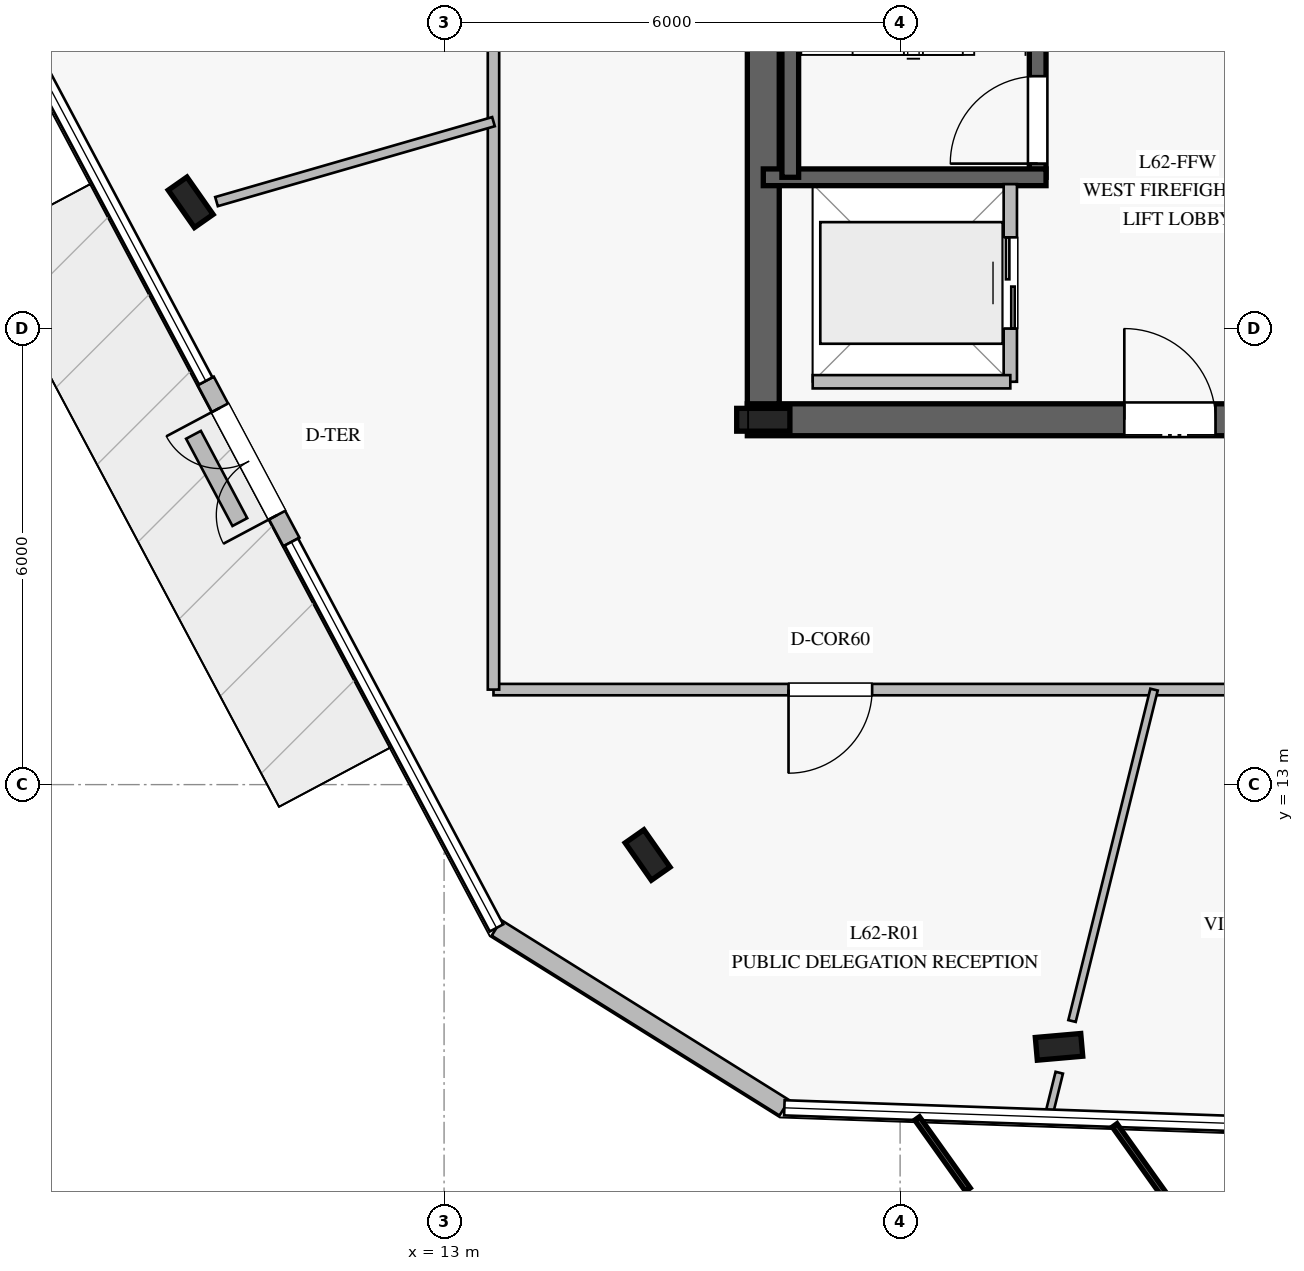
"""IFC4 building model, lengths in metres.
Left out: names, types, materials, properties, quantities, classifications, styles, units other than length and angle.
Written with IfcOpenShell. Run it as: python <this file> out.ifc"""

import sys

from ifc_helpers import new_model, si_unit, direction, frame, frame_2d, origin, origin_2d, place, context, subcontext, project, spatial, rectangle, i_section, extrude, element, fill, save


model = new_model("IFC4")
c1 = context("Model", 3, precision=1e-05, world=origin(), true_north=direction((0.0, 1.0)))
c2 = subcontext(c1, "Body", "Model", "MODEL_VIEW")
j1 = project(units=[si_unit("LENGTHUNIT", "METRE"), si_unit("PLANEANGLEUNIT", "RADIAN")], contexts=[c1])
p1 = place(None, origin())
s1 = spatial("IfcSite", under=j1, at=p1, CompositionType="ELEMENT")
p2 = place(p1, origin())
s2 = spatial("IfcBuilding", under=s1, at=p2, CompositionType="ELEMENT")
p3 = place(p2, frame((0.0, 0.0, 258.2)))
s3 = spatial("IfcBuildingStorey", under=s2, at=p3, CompositionType="ELEMENT", Elevation=258.2)
p4 = place(p3, frame((16.99, 17.8, 0.0), z_axis=(0.0, 0.0, 1.0), x_axis=(1.0, 0.0, 0.0)))
e1 = element("IfcWall", 1, at=p4, inside=s3, PredefinedType="SHEAR", context=c2, shape_type="SweptSolid", body=[
    extrude(rectangle(XDim=16.02, YDim=0.42, at=frame_2d((8.01, 0.0))), origin(), (0.0, 0.0, 1.0), 3.78),
])
p5 = place(p4, frame((4.96, 0.0, 0.0)))
e2 = element("IfcOpeningElement", 2, at=p5, cuts=e1, PredefinedType="OPENING", context=c2, shape_type="SweptSolid", body=[
    extrude(rectangle(XDim=1.2, YDim=2.25, at=frame_2d((0.6, 1.125))), frame((0.0, 0.22, 0.0), z_axis=(0.0, -1.0, 0.0), x_axis=(1.0, 0.0, 0.0)), (0.0, 0.0, 1.0), 0.44),
])
p6 = place(p4, frame((13.91, 0.0, 0.0)))
e3 = element("IfcOpeningElement", 3, at=p6, cuts=e1, PredefinedType="OPENING", context=c2, shape_type="SweptSolid", body=[
    extrude(rectangle(XDim=0.9, YDim=2.1, at=frame_2d((0.45, 1.05))), frame((0.0, 0.22, 0.0), z_axis=(0.0, -1.0, 0.0), x_axis=(1.0, 0.0, 0.0)), (0.0, 0.0, 1.0), 0.44),
])
p7 = place(p4, frame((9.16, 0.0, 0.0)))
e4 = element("IfcOpeningElement", 4, at=p7, cuts=e1, PredefinedType="OPENING", context=c2, shape_type="SweptSolid", body=[
    extrude(rectangle(XDim=1.1, YDim=2.2, at=frame_2d((0.55, 1.1))), frame((0.0, 0.22, 0.0), z_axis=(0.0, -1.0, 0.0), x_axis=(1.0, 0.0, 0.0)), (0.0, 0.0, 1.0), 0.44),
])
p8 = place(p3, frame((17.2, 31.99, 0.0), z_axis=(0.0, 0.0, 1.0), x_axis=(0.0, -1.0, 0.0)))
e5 = element("IfcWall", 5, at=p8, inside=s3, PredefinedType="SHEAR", context=c2, shape_type="SweptSolid", body=[
    extrude(rectangle(XDim=13.98, YDim=0.42, at=frame_2d((6.99, 0.0))), origin(), (0.0, 0.0, 1.0), 3.78),
])
p9 = place(p8, frame((2.14, 0.0, 0.0)))
e6 = element("IfcOpeningElement", 6, at=p9, cuts=e5, PredefinedType="OPENING", context=c2, shape_type="SweptSolid", body=[
    extrude(rectangle(XDim=1.5, YDim=2.2, at=frame_2d((0.75, 1.1))), frame((0.0, 0.22, 0.0), z_axis=(0.0, -1.0, 0.0), x_axis=(1.0, 0.0, 0.0)), (0.0, 0.0, 1.0), 0.44),
])
p10 = place(p3, frame((17.2, 17.8, 0.0), z_axis=(0.0, 0.0, 1.0), x_axis=(1.0, 0.0, 0.0)))
e7 = element("IfcColumn", 7, at=p10, inside=s3, PredefinedType="COLUMN", context=c2, shape_type="SweptSolid", body=[
    extrude(i_section(OverallWidth=0.3, OverallDepth=0.7, WebThickness=0.017, FlangeThickness=0.032, at=origin_2d()), origin(), (0.0, 0.0, 1.0), 4.0),
])
p11 = place(p3, frame((20.81, 20.99, 0.0), z_axis=(0.0, 0.0, 1.0), x_axis=(0.0, 1.0, 0.0)))
e8 = element("IfcWall", 8, at=p11, inside=s3, PredefinedType="SOLIDWALL", context=c2, shape_type="SweptSolid", body=[
    extrude(rectangle(XDim=7.22, YDim=0.22, at=frame_2d((3.61, 0.0))), origin(), (0.0, 0.0, 1.0), 3.78),
])
p12 = place(p11, frame((0.18, 0.0, 0.0)))
e9 = element("IfcOpeningElement", 9, at=p12, cuts=e8, PredefinedType="OPENING", context=c2, shape_type="SweptSolid", body=[
    extrude(rectangle(XDim=1.15, YDim=2.2, at=frame_2d((0.575, 1.1))), frame((0.0, 0.12, 0.0), z_axis=(0.0, -1.0, 0.0), x_axis=(1.0, 0.0, 0.0)), (0.0, 0.0, 1.0), 0.24),
])
p13 = place(p3, frame((17.2, 20.99, 0.0), z_axis=(0.0, 0.0, 1.0), x_axis=(1.0, 0.0, 0.0)))
e10 = element("IfcWall", 10, at=p13, inside=s3, PredefinedType="SOLIDWALL", context=c2, shape_type="SweptSolid", body=[
    extrude(rectangle(XDim=3.72, YDim=0.22, at=frame_2d((1.86, 0.0))), origin(), (0.0, 0.0, 1.0), 3.78),
])
p14 = place(p3, frame((17.555, 28.21, 0.0), z_axis=(0.0, 0.0, 1.0), x_axis=(0.0, -1.0, 0.0)))
e11 = element("IfcWall", 11, at=p14, inside=s3, PredefinedType="SOLIDWALL", context=c2, shape_type="SweptSolid", body=[
    extrude(rectangle(XDim=7.22, YDim=0.22, at=frame_2d((3.61, 0.0))), origin(), (0.0, 0.0, 1.0), 3.78),
])
for number, where, z_axis, x_axis in (
    (12, (9.666, 20.661, 0.0), (0.0, 0.0, 1.0), (-0.574, 0.819, 0.0)),
    (13, (15.678, 12.074, 0.0), (0.0, 0.0, 1.0), (-0.574, 0.819, 0.0)),
    (14, (21.091, 9.55, 0.0), (0.0, 0.0, 1.0), (0.996, 0.087, 0.0)),
):
    element("IfcColumn", number, at=place(p3, frame(where, z_axis=z_axis, x_axis=x_axis)), inside=s3, PredefinedType="COLUMN", context=c2, shape_type="SweptSolid", body=[
        extrude(i_section(OverallWidth=0.3, OverallDepth=0.6, WebThickness=0.015, FlangeThickness=0.03, at=origin_2d()), origin(), (0.0, 0.0, 1.0), 4.0),
    ])
p15 = place(p3, frame((9.864, 18.311, 0.0), z_axis=(0.0, 0.0, 1.0), x_axis=(0.469531998299, -0.882915456073, 0.0)))
e15 = element("IfcWall", 15, at=p15, inside=s3, PredefinedType="STANDARD", context=c2, shape_type="SweptSolid", body=[
    extrude(rectangle(XDim=2.4, YDim=0.24, at=frame_2d((1.2, 0.0))), origin(), (0.0, 0.0, 1.0), 3.78),
])
p16 = place(p15, frame((0.4, 0.0, 0.0)))
e16 = element("IfcOpeningElement", 16, at=p16, cuts=e15, PredefinedType="OPENING", context=c2, shape_type="SweptSolid", body=[
    extrude(rectangle(XDim=1.6, YDim=2.25, at=frame_2d((0.8, 1.125))), frame((0.0, 0.13, 0.0), z_axis=(0.0, -1.0, 0.0), x_axis=(1.0, 0.0, 0.0)), (0.0, 0.0, 1.0), 0.26),
])
p17 = place(p3, frame((13.69, 11.115, 0.0), z_axis=(0.0, 0.0, 1.0), x_axis=(0.847998304005, -0.529998940003, 0.0)))
e17 = element("IfcWall", 17, at=p17, inside=s3, PredefinedType="STANDARD", context=c2, shape_type="SweptSolid", body=[
    extrude(rectangle(XDim=4.466, YDim=0.24, at=frame_2d((2.233, 0.0))), origin(), (0.0, 0.0, 1.0), 3.78),
])
p18 = place(p3, frame((9.703, 17.602, 0.0), z_axis=(0.0, 0.0, 1.0), x_axis=(0.4693108362, -0.883033033938, 0.0)))
e18 = element("IfcWall", 18, at=p18, inside=s3, PredefinedType="USERDEFINED", context=c2, shape_type="SweptSolid", body=[
    extrude(rectangle(XDim=1.3, YDim=0.22, at=frame_2d((0.65, 0.0))), origin(), (0.0, 0.0, 1.0), 0.4),
])
p19 = place(p3, frame((20.45, 18.3, 0.0), z_axis=(0.0, 0.0, 1.0), x_axis=(0.0, 1.0, 0.0)))
e19 = element("IfcWall", 19, at=p19, inside=s3, PredefinedType="PARTITIONING", context=c2, shape_type="SweptSolid", body=[
    extrude(rectangle(XDim=2.6, YDim=0.175, at=frame_2d((1.3, 0.0))), origin(), (0.0, 0.0, 1.0), 3.78),
])
p20 = place(p19, frame((0.7, 0.0, 0.0)))
e20 = element("IfcOpeningElement", 20, at=p20, cuts=e19, PredefinedType="OPENING", context=c2, shape_type="SweptSolid", body=[
    extrude(rectangle(XDim=1.2, YDim=2.2, at=frame_2d((0.6, 1.1))), frame((0.0, 0.098, 0.0), z_axis=(0.0, -1.0, 0.0), x_axis=(1.0, 0.0, 0.0)), (0.0, 0.0, 1.0), 0.195),
])
p21 = place(p3, frame((17.85, 18.3, 0.0), z_axis=(0.0, 0.0, 1.0), x_axis=(1.0, 0.0, 0.0)))
e21 = element("IfcWall", 21, at=p21, inside=s3, PredefinedType="PARTITIONING", context=c2, shape_type="SweptSolid", body=[
    extrude(rectangle(XDim=2.6, YDim=0.175, at=frame_2d((1.3, 0.0))), origin(), (0.0, 0.0, 1.0), 3.78),
])
p22 = place(p3, frame((36.35, 14.25, 0.0), z_axis=(0.0, 0.0, 1.0), x_axis=(-1.0, 0.0, 0.0)))
e22 = element("IfcWall", 22, at=p22, inside=s3, PredefinedType="PARTITIONING", context=c2, shape_type="SweptSolid", body=[
    extrude(rectangle(XDim=22.7, YDim=0.15, at=frame_2d((11.35, 0.0))), origin(), (0.0, 0.0, 1.0), 3.28),
])
p23 = place(p22, frame((17.718, 0.0, 0.0)))
e23 = element("IfcOpeningElement", 23, at=p23, cuts=e22, PredefinedType="OPENING", context=c2, shape_type="SweptSolid", body=[
    extrude(rectangle(XDim=1.1, YDim=2.2, at=frame_2d((0.55, 1.1))), frame((0.0, 0.085, 0.0), z_axis=(0.0, -1.0, 0.0), x_axis=(1.0, 0.0, 0.0)), (0.0, 0.0, 1.0), 0.17),
])
p24 = place(p22, frame((8.322, 0.0, 0.0)))
e24 = element("IfcOpeningElement", 24, at=p24, cuts=e22, PredefinedType="OPENING", context=c2, shape_type="SweptSolid", body=[
    extrude(rectangle(XDim=1.1, YDim=2.2, at=frame_2d((0.55, 1.1))), frame((0.0, 0.085, 0.0), z_axis=(0.0, -1.0, 0.0), x_axis=(1.0, 0.0, 0.0)), (0.0, 0.0, 1.0), 0.17),
])
p25 = place(p3, frame((13.65, 14.25, 0.0), z_axis=(0.0, 0.0, 1.0), x_axis=(0.0, 1.0, 0.0)))
e25 = element("IfcWall", 25, at=p25, inside=s3, PredefinedType="PARTITIONING", context=c2, shape_type="SweptSolid", body=[
    extrude(rectangle(XDim=21.5, YDim=0.15, at=frame_2d((10.75, 0.0))), origin(), (0.0, 0.0, 1.0), 3.25),
])
p26 = place(p25, frame((13.352, 0.0, 0.0)))
e26 = element("IfcOpeningElement", 26, at=p26, cuts=e25, PredefinedType="OPENING", context=c2, shape_type="SweptSolid", body=[
    extrude(rectangle(XDim=1.1, YDim=2.2, at=frame_2d((0.55, 1.1))), frame((0.0, 0.085, 0.0), z_axis=(0.0, -1.0, 0.0), x_axis=(1.0, 0.0, 0.0)), (0.0, 0.0, 1.0), 0.17),
])
p27 = place(p3, frame((13.65, 21.722, 0.0), z_axis=(0.0, 0.0, 1.0), x_axis=(-0.960759940579, -0.277381211655, 0.0)))
e27 = element("IfcWall", 27, at=p27, inside=s3, PredefinedType="PARTITIONING", context=c2, shape_type="SweptSolid", body=[
    extrude(rectangle(XDim=3.793, YDim=0.125, at=frame_2d((1.896, 0.0))), origin(), (0.0, 0.0, 1.0), 3.28),
])
p28 = place(p3, frame((22.341, 14.25, 0.0), z_axis=(0.0, 0.0, 1.0), x_axis=(-0.240245677683, -0.970712117136, 0.0)))
e28 = element("IfcWall", 28, at=p28, inside=s3, PredefinedType="MOVABLE", context=c2, shape_type="SweptSolid", body=[
    extrude(rectangle(XDim=4.492, YDim=0.1, at=frame_2d((2.246, 0.0))), origin(), (0.0, 0.0, 1.0), 3.42),
])
p29 = place(p3, frame((21.094, 9.21, 0.0), z_axis=(0.0, 0.0, 1.0), x_axis=(-0.239583063614, -0.970875870351, 0.0)))
e29 = element("IfcWall", 29, at=p29, inside=s3, PredefinedType="MOVABLE", context=c2, shape_type="SweptSolid", body=[
    extrude(rectangle(XDim=0.584, YDim=0.1, at=frame_2d((0.292, 0.0))), origin(), (0.0, 0.0, 1.0), 3.78),
])
p30 = place(p16, frame((1.6, 0.0, 0.0), z_axis=(0.0, 0.0, 1.0), x_axis=(-1.0, 0.0, 0.0)))
e30 = element("IfcDoor", 30, at=p30, inside=s3, OperationType="DOUBLE_DOOR_SINGLE_SWING", PredefinedType="DOOR", context=c2, shape_type="SweptSolid", body=[
    extrude(rectangle(XDim=1.6, YDim=2.25, at=frame_2d((0.8, 1.125))), frame((0.0, 0.025, 0.0), z_axis=(0.0, -1.0, 0.0), x_axis=(1.0, 0.0, 0.0)), (0.0, 0.0, 1.0), 0.05),
])
fill(e16, e30)
p31 = place(p12, origin())
e31 = element("IfcDoor", 31, at=p31, inside=s3, OperationType="SINGLE_SWING_LEFT", PredefinedType="DOOR", context=c2, shape_type="SweptSolid", body=[
    extrude(rectangle(XDim=1.15, YDim=2.2, at=frame_2d((0.575, 1.1))), frame((0.0, 0.025, 0.0), z_axis=(0.0, -1.0, 0.0), x_axis=(1.0, 0.0, 0.0)), (0.0, 0.0, 1.0), 0.05),
])
fill(e9, e31)
p32 = place(p5, origin())
e32 = element("IfcDoor", 32, at=p32, inside=s3, OperationType="SINGLE_SWING_LEFT", PredefinedType="DOOR", context=c2, shape_type="SweptSolid", body=[
    extrude(rectangle(XDim=1.2, YDim=2.25, at=frame_2d((0.6, 1.125))), frame((0.0, 0.025, 0.0), z_axis=(0.0, -1.0, 0.0), x_axis=(1.0, 0.0, 0.0)), (0.0, 0.0, 1.0), 0.05),
])
fill(e2, e32)
p33 = place(p20, origin())
e33 = element("IfcDoor", 33, at=p33, inside=s3, OperationType="DOUBLE_DOOR_SLIDING", PredefinedType="DOOR", context=c2, shape_type="SweptSolid", body=[
    extrude(rectangle(XDim=1.2, YDim=2.2, at=frame_2d((0.6, 1.1))), frame((0.0, 0.025, 0.0), z_axis=(0.0, -1.0, 0.0), x_axis=(1.0, 0.0, 0.0)), (0.0, 0.0, 1.0), 0.05),
])
fill(e20, e33)
p34 = place(p23, origin())
e34 = element("IfcDoor", 34, at=p34, inside=s3, OperationType="SINGLE_SWING_RIGHT", PredefinedType="DOOR", context=c2, shape_type="SweptSolid", body=[
    extrude(rectangle(XDim=1.1, YDim=2.2, at=frame_2d((0.55, 1.1))), frame((0.0, 0.025, 0.0), z_axis=(0.0, -1.0, 0.0), x_axis=(1.0, 0.0, 0.0)), (0.0, 0.0, 1.0), 0.05),
])
fill(e23, e34)
save(model, sys.argv[1])
